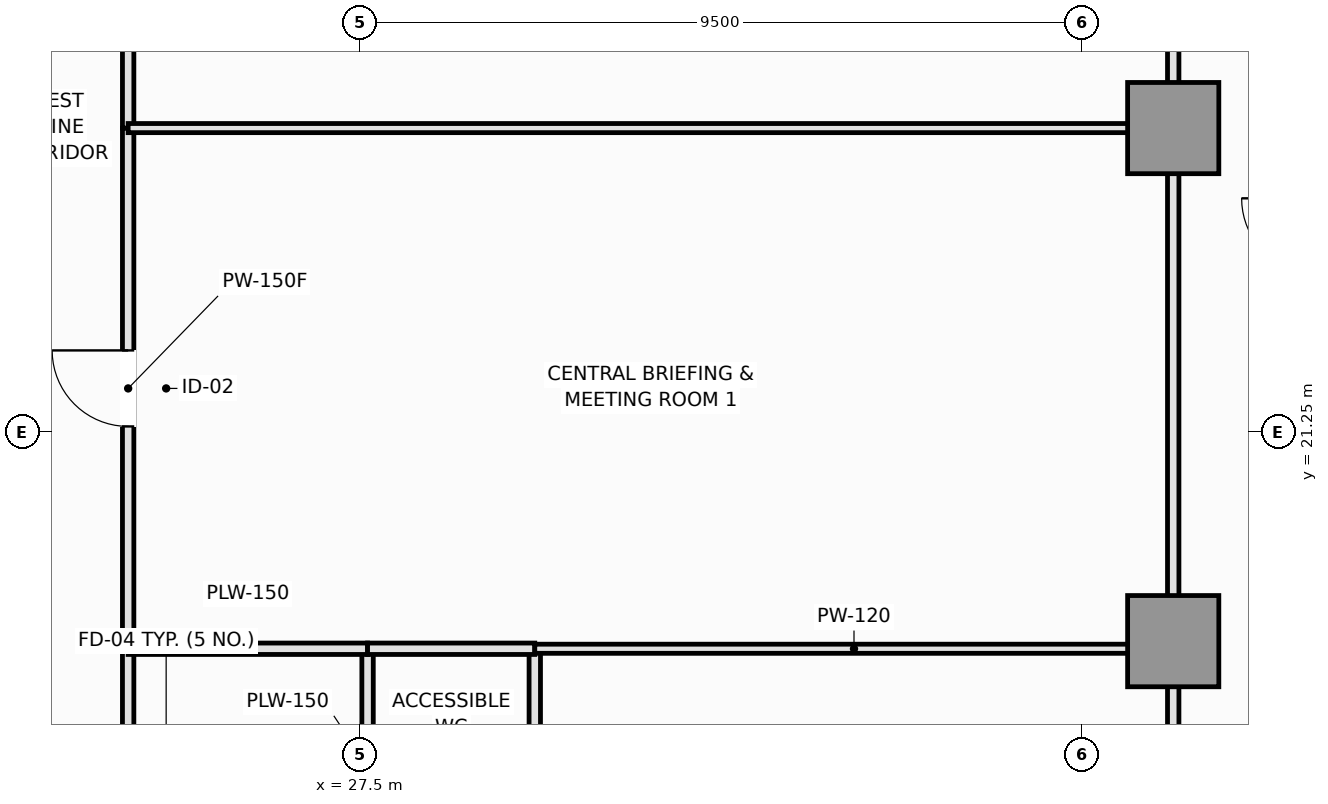
"""IFC4 building model, lengths in metres.
Left out: names, types, materials, properties, quantities, classifications, styles, units other than length and angle.
Written with IfcOpenShell. Run it as: python <this file> out.ifc"""

import sys

from ifc_helpers import new_model, si_unit, direction, frame, frame_2d, origin, origin_2d, place, context, subcontext, project, spatial, rectangle, extrude, element, fill, save


model = new_model("IFC4")
c1 = context("Model", 3, precision=1e-05, world=origin(), true_north=direction((0.0, 1.0)))
c2 = subcontext(c1, "Body", "Model", "MODEL_VIEW")
j1 = project(units=[si_unit("LENGTHUNIT", "METRE"), si_unit("PLANEANGLEUNIT", "RADIAN")], contexts=[c1])
p1 = place(None, origin())
s1 = spatial("IfcSite", under=j1, at=p1, CompositionType="ELEMENT")
p2 = place(p1, origin())
s2 = spatial("IfcBuilding", under=s1, at=p2, CompositionType="ELEMENT")
p3 = place(p2, frame((0.0, 0.0, 54.0)))
s3 = spatial("IfcBuildingStorey", under=s2, at=p3, CompositionType="ELEMENT", Elevation=54.0)
for number, where, z_axis, x_axis in (
    (1, (38.2, 18.5, 0.0), (0.0, 0.0, 1.0), (1.0, 0.0, 0.0)),
    (2, (38.2, 25.25, 0.0), (0.0, 0.0, 1.0), (1.0, 0.0, 0.0)),
):
    element("IfcColumn", number, at=place(p3, frame(where, z_axis=z_axis, x_axis=x_axis)), inside=s3, PredefinedType="COLUMN", context=c2, shape_type="SweptSolid", body=[
        extrude(rectangle(XDim=1.2, YDim=1.2, at=origin_2d()), origin(), (0.0, 0.0, 1.0), 3.55),
    ])
p4 = place(p3, frame((24.45, 15.3, 0.0), z_axis=(0.0, 0.0, 1.0), x_axis=(0.0, 1.0, 0.0)))
e3 = element("IfcWall", 3, at=p4, inside=s3, PredefinedType="PLUMBINGWALL", context=c2, shape_type="SweptSolid", body=[
    extrude(rectangle(XDim=3.1, YDim=0.15, at=frame_2d((1.55, 0.0))), origin(), (0.0, 0.0, 1.0), 3.37),
])
p5 = place(p4, frame((1.1, 0.0, 0.0)))
e4 = element("IfcOpeningElement", 4, at=p5, cuts=e3, PredefinedType="OPENING", context=c2, shape_type="SweptSolid", body=[
    extrude(rectangle(XDim=0.9, YDim=2.1, at=frame_2d((0.45, 1.05))), frame((0.0, 0.085, 0.0), z_axis=(0.0, -1.0, 0.0), x_axis=(1.0, 0.0, 0.0)), (0.0, 0.0, 1.0), 0.17),
])
p6 = place(p3, frame((24.45, 18.4, 0.0), z_axis=(0.0, 0.0, 1.0), x_axis=(0.0, 1.0, 0.0)))
e5 = element("IfcWall", 5, at=p6, inside=s3, PredefinedType="PARTITIONING", context=c2, shape_type="SweptSolid", body=[
    extrude(rectangle(XDim=6.85, YDim=0.15, at=frame_2d((3.425, 0.0))), origin(), (0.0, 0.0, 1.0), 3.37),
])
p7 = place(p6, frame((2.925, 0.0, 0.0)))
e6 = element("IfcOpeningElement", 6, at=p7, cuts=e5, PredefinedType="OPENING", context=c2, shape_type="SweptSolid", body=[
    extrude(rectangle(XDim=1.0, YDim=2.15, at=frame_2d((0.5, 1.075))), frame((0.0, 0.085, 0.0), z_axis=(0.0, -1.0, 0.0), x_axis=(1.0, 0.0, 0.0)), (0.0, 0.0, 1.0), 0.17),
])
p8 = place(p3, frame((24.45, 25.25, 0.0), z_axis=(0.0, 0.0, 1.0), x_axis=(0.0, 1.0, 0.0)))
e7 = element("IfcWall", 7, at=p8, inside=s3, PredefinedType="PARTITIONING", context=c2, shape_type="SweptSolid", body=[
    extrude(rectangle(XDim=6.85, YDim=0.15, at=frame_2d((3.425, 0.0))), origin(), (0.0, 0.0, 1.0), 3.37),
])
p9 = place(p8, frame((2.925, 0.0, 0.0)))
e8 = element("IfcOpeningElement", 8, at=p9, cuts=e7, PredefinedType="OPENING", context=c2, shape_type="SweptSolid", body=[
    extrude(rectangle(XDim=1.0, YDim=2.15, at=frame_2d((0.5, 1.075))), frame((0.0, 0.085, 0.0), z_axis=(0.0, -1.0, 0.0), x_axis=(1.0, 0.0, 0.0)), (0.0, 0.0, 1.0), 0.17),
])
p10 = place(p3, frame((38.2, 15.3, 0.0), z_axis=(0.0, 0.0, 1.0), x_axis=(0.0, 1.0, 0.0)))
e9 = element("IfcWall", 9, at=p10, inside=s3, PredefinedType="PARTITIONING", context=c2, shape_type="SweptSolid", body=[
    extrude(rectangle(XDim=3.1, YDim=0.15, at=frame_2d((1.55, 0.0))), origin(), (0.0, 0.0, 1.0), 2.82),
])
p11 = place(p10, frame((1.05, 0.0, 0.0)))
e10 = element("IfcOpeningElement", 10, at=p11, cuts=e9, PredefinedType="OPENING", context=c2, shape_type="SweptSolid", body=[
    extrude(rectangle(XDim=1.0, YDim=2.15, at=frame_2d((0.5, 1.075))), frame((0.0, 0.085, 0.0), z_axis=(0.0, -1.0, 0.0), x_axis=(1.0, 0.0, 0.0)), (0.0, 0.0, 1.0), 0.17),
])
for number, where, z_axis, x_axis in (
    (11, (38.2, 18.4, 0.0), (0.0, 0.0, 1.0), (0.0, 1.0, 0.0)),
    (12, (38.2, 25.25, 0.0), (0.0, 0.0, 1.0), (0.0, 1.0, 0.0)),
):
    element("IfcWall", number, at=place(p3, frame(where, z_axis=z_axis, x_axis=x_axis)), inside=s3, PredefinedType="PARTITIONING", context=c2, shape_type="SweptSolid", body=[
        extrude(rectangle(XDim=6.85, YDim=0.15, at=frame_2d((3.425, 0.0))), origin(), (0.0, 0.0, 1.0), 2.82),
    ])
p12 = place(p3, frame((27.6, 15.3, 0.0), z_axis=(0.0, 0.0, 1.0), x_axis=(0.0, 1.0, 0.0)))
e13 = element("IfcWall", 13, at=p12, inside=s3, PredefinedType="PLUMBINGWALL", context=c2, shape_type="SweptSolid", body=[
    extrude(rectangle(XDim=3.1, YDim=0.15, at=frame_2d((1.55, 0.0))), origin(), (0.0, 0.0, 1.0), 3.37),
])
p13 = place(p3, frame((24.45, 18.4, 0.0), z_axis=(0.0, 0.0, 1.0), x_axis=(1.0, 0.0, 0.0)))
e14 = element("IfcWall", 14, at=p13, inside=s3, PredefinedType="PLUMBINGWALL", context=c2, shape_type="SweptSolid", body=[
    extrude(rectangle(XDim=3.15, YDim=0.15, at=frame_2d((1.575, 0.0))), origin(), (0.0, 0.0, 1.0), 2.72),
])
p14 = place(p3, frame((29.8, 15.3, 0.0), z_axis=(0.0, 0.0, 1.0), x_axis=(0.0, 1.0, 0.0)))
e15 = element("IfcWall", 15, at=p14, inside=s3, PredefinedType="PLUMBINGWALL", context=c2, shape_type="SweptSolid", body=[
    extrude(rectangle(XDim=3.1, YDim=0.15, at=frame_2d((1.55, 0.0))), origin(), (0.0, 0.0, 1.0), 3.37),
])
p15 = place(p3, frame((27.6, 18.4, 0.0), z_axis=(0.0, 0.0, 1.0), x_axis=(1.0, 0.0, 0.0)))
e16 = element("IfcWall", 16, at=p15, inside=s3, PredefinedType="PLUMBINGWALL", context=c2, shape_type="SweptSolid", body=[
    extrude(rectangle(XDim=2.2, YDim=0.15, at=frame_2d((1.1, 0.0))), origin(), (0.0, 0.0, 1.0), 2.72),
])
p16 = place(p3, frame((29.8, 18.4, 0.0), z_axis=(0.0, 0.0, 1.0), x_axis=(1.0, 0.0, 0.0)))
e17 = element("IfcWall", 17, at=p16, inside=s3, PredefinedType="PARTITIONING", context=c2, shape_type="SweptSolid", body=[
    extrude(rectangle(XDim=8.4, YDim=0.12, at=frame_2d((4.2, 0.0))), origin(), (0.0, 0.0, 1.0), 2.72),
])
p17 = place(p3, frame((24.45, 25.25, 0.0), z_axis=(0.0, 0.0, 1.0), x_axis=(1.0, 0.0, 0.0)))
e18 = element("IfcWall", 18, at=p17, inside=s3, PredefinedType="PARTITIONING", context=c2, shape_type="SweptSolid", body=[
    extrude(rectangle(XDim=13.75, YDim=0.12, at=frame_2d((6.875, 0.0))), origin(), (0.0, 0.0, 1.0), 2.72),
])
p18 = place(p7, origin())
e19 = element("IfcDoor", 19, at=p18, inside=s3, OperationType="SINGLE_SWING_RIGHT", PredefinedType="DOOR", context=c2, shape_type="SweptSolid", body=[
    extrude(rectangle(XDim=1.0, YDim=2.15, at=frame_2d((0.5, 1.075))), frame((0.0, 0.025, 0.0), z_axis=(0.0, -1.0, 0.0), x_axis=(1.0, 0.0, 0.0)), (0.0, 0.0, 1.0), 0.05),
])
fill(e6, e19)
save(model, sys.argv[1])
